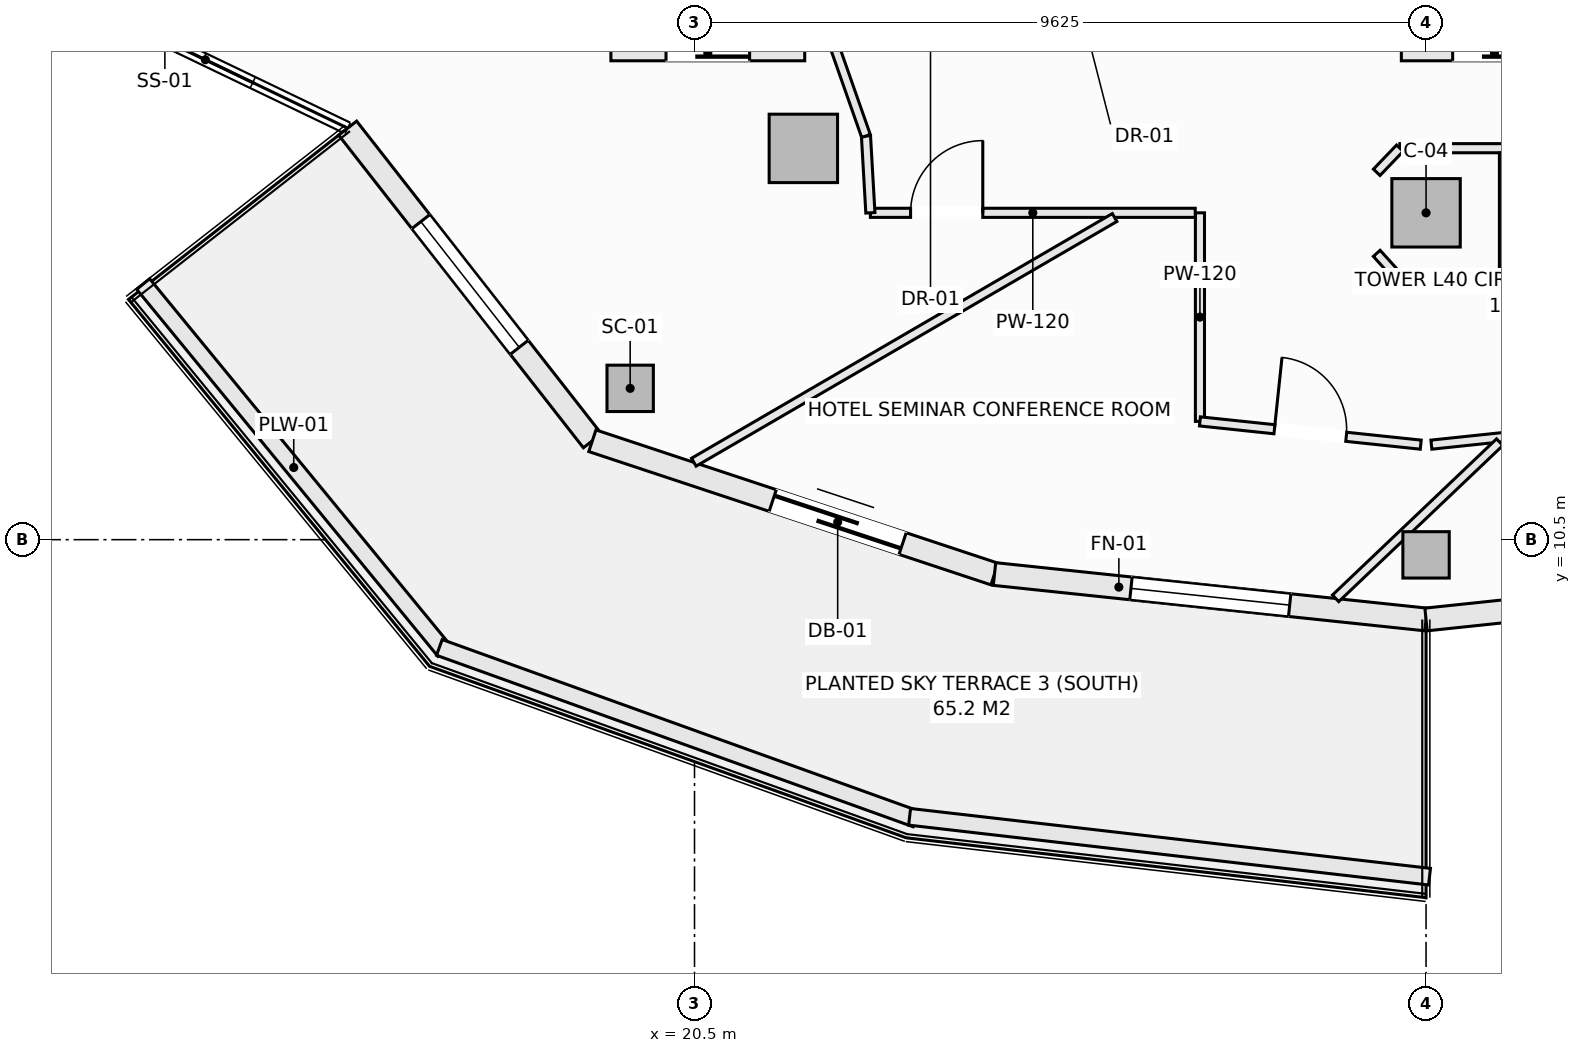
"""IFC4 building model, lengths in metres.
Left out: names, types, materials, properties, quantities, classifications, styles, units other than length and angle.
Written with IfcOpenShell. Run it as: python <this file> out.ifc"""

import sys

from ifc_helpers import new_model, si_unit, direction, frame, frame_2d, origin, origin_2d, place, context, subcontext, project, spatial, rectangle, hollow_rectangle, extrude, element, fill, save


model = new_model("IFC4")
c1 = context("Model", 3, precision=1e-05, world=origin(), true_north=direction((0.0, 1.0)))
c2 = subcontext(c1, "Body", "Model", "MODEL_VIEW")
j1 = project(units=[si_unit("LENGTHUNIT", "METRE"), si_unit("PLANEANGLEUNIT", "RADIAN")], contexts=[c1])
p1 = place(None, origin())
s1 = spatial("IfcSite", under=j1, at=p1, CompositionType="ELEMENT")
p2 = place(p1, origin())
s2 = spatial("IfcBuilding", under=s1, at=p2, CompositionType="ELEMENT")
p3 = place(p2, frame((0.0, 0.0, 156.3)))
s3 = spatial("IfcBuildingStorey", under=s2, at=p3, CompositionType="ELEMENT", Elevation=156.3)
for number, where, z_axis, x_axis in (
    (1, (19.654, 12.49, -0.27), (0.0, 0.0, 1.0), (1.0, 0.0, 0.0)),
    (2, (30.125, 10.3, -0.27), (0.0, 0.0, 1.0), (1.0, 0.0, 0.0)),
):
    element("IfcColumn", number, at=place(p3, frame(where, z_axis=z_axis, x_axis=x_axis)), inside=s3, PredefinedType="COLUMN", context=c2, shape_type="SweptSolid", body=[
        extrude(hollow_rectangle(XDim=0.61, YDim=0.61, WallThickness=0.025, at=origin_2d()), origin(), (0.0, 0.0, 1.0), 3.4),
    ])
for number, where, z_axis, x_axis in (
    (3, (21.932, 15.648, -0.27), (0.0, 0.0, 1.0), (1.0, 0.0, 0.0)),
    (4, (30.125, 14.8, -0.27), (0.0, 0.0, 1.0), (1.0, 0.0, 0.0)),
):
    element("IfcColumn", number, at=place(p3, frame(where, z_axis=z_axis, x_axis=x_axis)), inside=s3, PredefinedType="COLUMN", context=c2, shape_type="SweptSolid", body=[
        extrude(rectangle(XDim=0.9, YDim=0.9, at=origin_2d()), origin(), (0.0, 0.0, 1.0), 3.4),
    ])
p4 = place(p3, frame((15.937, 15.914, 0.0), z_axis=(0.0, 0.0, 1.0), x_axis=(0.616429245738, -0.787410302828, 0.0)))
e5 = element("IfcWall", 5, at=p4, inside=s3, PredefinedType="SOLIDWALL", context=c2, shape_type="SweptSolid", body=[
    extrude(rectangle(XDim=5.223, YDim=0.3, at=frame_2d((2.612, 0.0))), origin(), (0.0, 0.0, 1.0), 2.653),
])
p5 = place(p4, frame((1.562, 0.0, 0.74)))
e6 = element("IfcOpeningElement", 6, at=p5, cuts=e5, PredefinedType="OPENING", context=c2, shape_type="SweptSolid", body=[
    extrude(rectangle(XDim=2.1, YDim=1.7, at=frame_2d((1.05, 0.85))), frame((0.0, 0.16, 0.0), z_axis=(0.0, -1.0, 0.0), x_axis=(1.0, 0.0, 0.0)), (0.0, 0.0, 1.0), 0.32),
])
p6 = place(p3, frame((19.156, 11.801, 0.0), z_axis=(0.0, 0.0, 1.0), x_axis=(0.949246811547, -0.314532177636, 0.0)))
e7 = element("IfcWall", 7, at=p6, inside=s3, PredefinedType="SOLIDWALL", context=c2, shape_type="SweptSolid", body=[
    extrude(rectangle(XDim=5.574, YDim=0.3, at=frame_2d((2.787, 0.0))), origin(), (0.0, 0.0, 1.0), 2.653),
])
p7 = place(p6, frame((2.5, 0.0, 0.0)))
e8 = element("IfcOpeningElement", 8, at=p7, cuts=e7, PredefinedType="OPENING", context=c2, shape_type="SweptSolid", body=[
    extrude(rectangle(XDim=1.8, YDim=2.25, at=frame_2d((0.9, 1.125))), frame((0.0, 0.16, 0.0), z_axis=(0.0, -1.0, 0.0), x_axis=(1.0, 0.0, 0.0)), (0.0, 0.0, 1.0), 0.32),
])
p8 = place(p3, frame((24.447, 10.048, 0.0), z_axis=(0.0, 0.0, 1.0), x_axis=(0.994496545245, -0.104769372887, 0.0)))
e9 = element("IfcWall", 9, at=p8, inside=s3, PredefinedType="SOLIDWALL", context=c2, shape_type="SweptSolid", body=[
    extrude(rectangle(XDim=5.709, YDim=0.3, at=frame_2d((2.854, 0.0))), origin(), (0.0, 0.0, 1.0), 2.653),
])
p9 = place(p8, frame((1.805, 0.0, 0.74)))
e10 = element("IfcOpeningElement", 10, at=p9, cuts=e9, PredefinedType="OPENING", context=c2, shape_type="SweptSolid", body=[
    extrude(rectangle(XDim=2.1, YDim=1.7, at=frame_2d((1.05, 0.85))), frame((0.0, 0.16, 0.0), z_axis=(0.0, -1.0, 0.0), x_axis=(1.0, 0.0, 0.0)), (0.0, 0.0, 1.0), 0.32),
])
p10 = place(p3, frame((30.125, 9.45, 0.0), z_axis=(0.0, 0.0, 1.0), x_axis=(0.994496545245, 0.104769372887, 0.0)))
e11 = element("IfcWall", 11, at=p10, inside=s3, PredefinedType="SOLIDWALL", context=c2, shape_type="SweptSolid", body=[
    extrude(rectangle(XDim=5.709, YDim=0.3, at=frame_2d((2.854, 0.0))), origin(), (0.0, 0.0, 1.0), 2.653),
])
p11 = place(p10, frame((1.805, 0.0, 0.74)))
e12 = element("IfcOpeningElement", 12, at=p11, cuts=e11, PredefinedType="OPENING", context=c2, shape_type="SweptSolid", body=[
    extrude(rectangle(XDim=2.1, YDim=1.7, at=frame_2d((1.05, 0.85))), frame((0.0, 0.16, 0.0), z_axis=(0.0, -1.0, 0.0), x_axis=(1.0, 0.0, 0.0)), (0.0, 0.0, 1.0), 0.32),
])
p12 = place(p3, frame((13.246, 13.863, 0.0), z_axis=(0.0, 0.0, 1.0), x_axis=(0.634429234628, -0.77298094818, 0.0)))
e13 = element("IfcWall", 13, at=p12, inside=s3, PredefinedType="PARAPET", context=c2, shape_type="SweptSolid", body=[
    extrude(rectangle(XDim=6.245, YDim=0.22, at=frame_2d((3.123, 0.0))), origin(), (0.0, 0.0, 1.0), 0.52),
])
p13 = place(p3, frame((17.143, 9.082, 0.0), z_axis=(0.0, 0.0, 1.0), x_axis=(0.940948576924, -0.338549517184, 0.0)))
e14 = element("IfcWall", 14, at=p13, inside=s3, PredefinedType="PARAPET", context=c2, shape_type="SweptSolid", body=[
    extrude(rectangle(XDim=6.664, YDim=0.22, at=frame_2d((3.332, 0.0))), origin(), (0.0, 0.0, 1.0), 0.52),
])
p14 = place(p3, frame((23.33, 6.854, 0.0), z_axis=(0.0, 0.0, 1.0), x_axis=(0.993440576506, -0.114349555972, 0.0)))
e15 = element("IfcWall", 15, at=p14, inside=s3, PredefinedType="PARAPET", context=c2, shape_type="SweptSolid", body=[
    extrude(rectangle(XDim=6.885, YDim=0.22, at=frame_2d((3.443, 0.0))), origin(), (0.0, 0.0, 1.0), 0.52),
])
p15 = place(p3, frame((19.4, 16.9, 0.0), z_axis=(0.0, 0.0, 1.0), x_axis=(1.0, 0.0, 0.0)))
e16 = element("IfcWall", 16, at=p15, inside=s3, PredefinedType="SOLIDWALL", context=c2, shape_type="SweptSolid", body=[
    extrude(rectangle(XDim=2.55, YDim=0.2, at=frame_2d((1.275, 0.0))), origin(), (0.0, 0.0, 1.0), 3.13),
])
p16 = place(p15, frame((0.725, 0.0, 0.0)))
e17 = element("IfcOpeningElement", 17, at=p16, cuts=e16, PredefinedType="OPENING", context=c2, shape_type="SweptSolid", body=[
    extrude(rectangle(XDim=1.1, YDim=2.2, at=frame_2d((0.55, 1.1))), frame((0.0, 0.11, 0.0), z_axis=(0.0, -1.0, 0.0), x_axis=(1.0, 0.0, 0.0)), (0.0, 0.0, 1.0), 0.22),
])
p17 = place(p3, frame((29.8, 16.9, 0.0), z_axis=(0.0, 0.0, 1.0), x_axis=(1.0, 0.0, 0.0)))
e18 = element("IfcWall", 18, at=p17, inside=s3, PredefinedType="SOLIDWALL", context=c2, shape_type="SweptSolid", body=[
    extrude(rectangle(XDim=2.45, YDim=0.2, at=frame_2d((1.225, 0.0))), origin(), (0.0, 0.0, 1.0), 3.13),
])
p18 = place(p17, frame((0.675, 0.0, 0.0)))
e19 = element("IfcOpeningElement", 19, at=p18, cuts=e18, PredefinedType="OPENING", context=c2, shape_type="SweptSolid", body=[
    extrude(rectangle(XDim=1.1, YDim=2.2, at=frame_2d((0.55, 1.1))), frame((0.0, 0.11, 0.0), z_axis=(0.0, -1.0, 0.0), x_axis=(1.0, 0.0, 0.0)), (0.0, 0.0, 1.0), 0.22),
])
p19 = place(p3, frame((27.15, 12.056, 0.0), z_axis=(0.0, 0.0, 1.0), x_axis=(0.0, 1.0, 0.0)))
e20 = element("IfcWall", 20, at=p19, inside=s3, PredefinedType="PARTITIONING", context=c2, shape_type="SweptSolid", body=[
    extrude(rectangle(XDim=2.744, YDim=0.12, at=frame_2d((1.372, 0.0))), origin(), (0.0, 0.0, 1.0), 3.13),
])
p20 = place(p3, frame((29.78, 15.65, 0.0), z_axis=(0.0, 0.0, 1.0), x_axis=(1.0, 0.0, 0.0)))
e21 = element("IfcWall", 21, at=p20, inside=s3, PredefinedType="PARTITIONING", context=c2, shape_type="SweptSolid", body=[
    extrude(rectangle(XDim=1.37, YDim=0.12, at=frame_2d((0.685, 0.0))), origin(), (0.0, 0.0, 1.0), 3.13),
])
p21 = place(p3, frame((30.195, 11.75, 0.0), z_axis=(0.0, 0.0, 1.0), x_axis=(0.994498907508, 0.104746947287, 0.0)))
e22 = element("IfcWall", 22, at=p21, inside=s3, PredefinedType="PARTITIONING", context=c2, shape_type="SweptSolid", body=[
    extrude(rectangle(XDim=5.724, YDim=0.12, at=frame_2d((2.862, 0.0))), origin(), (0.0, 0.0, 1.0), 3.13),
])
p22 = place(p21, frame((2.594, 0.0, 0.0)))
e23 = element("IfcOpeningElement", 23, at=p22, cuts=e22, PredefinedType="OPENING", context=c2, shape_type="SweptSolid", body=[
    extrude(rectangle(XDim=0.95, YDim=2.1, at=frame_2d((0.475, 1.05))), frame((0.0, 0.07, 0.0), z_axis=(0.0, -1.0, 0.0), x_axis=(1.0, 0.0, 0.0)), (0.0, 0.0, 1.0), 0.14),
])
p23 = place(p3, frame((27.15, 12.056, 0.0), z_axis=(0.0, 0.0, 1.0), x_axis=(0.994501330468, -0.104723940422, 0.0)))
e24 = element("IfcWall", 24, at=p23, inside=s3, PredefinedType="PARTITIONING", context=c2, shape_type="SweptSolid", body=[
    extrude(rectangle(XDim=2.921, YDim=0.12, at=frame_2d((1.46, 0.0))), origin(), (0.0, 0.0, 1.0), 3.13),
])
p24 = place(p23, frame((0.986, 0.0, 0.0)))
e25 = element("IfcOpeningElement", 25, at=p24, cuts=e24, PredefinedType="OPENING", context=c2, shape_type="SweptSolid", body=[
    extrude(rectangle(XDim=0.95, YDim=2.1, at=frame_2d((0.475, 1.05))), frame((0.0, 0.07, 0.0), z_axis=(0.0, -1.0, 0.0), x_axis=(1.0, 0.0, 0.0)), (0.0, 0.0, 1.0), 0.14),
])
p25 = place(p3, frame((22.814, 14.8, 0.0), z_axis=(0.0, 0.0, 1.0), x_axis=(1.0, 0.0, 0.0)))
e26 = element("IfcWall", 26, at=p25, inside=s3, PredefinedType="PARTITIONING", context=c2, shape_type="SweptSolid", body=[
    extrude(rectangle(XDim=4.274, YDim=0.12, at=frame_2d((2.137, 0.0))), origin(), (0.0, 0.0, 1.0), 3.13),
])
p26 = place(p25, frame((0.529, 0.0, 0.0)))
e27 = element("IfcOpeningElement", 27, at=p26, cuts=e26, PredefinedType="OPENING", context=c2, shape_type="SweptSolid", body=[
    extrude(rectangle(XDim=0.95, YDim=2.1, at=frame_2d((0.475, 1.05))), frame((0.0, 0.07, 0.0), z_axis=(0.0, -1.0, 0.0), x_axis=(1.0, 0.0, 0.0)), (0.0, 0.0, 1.0), 0.14),
])
p27 = place(p3, frame((22.756, 15.811, 0.0), z_axis=(0.0, 0.0, 1.0), x_axis=(0.057139047697, -0.998366230012, 0.0)))
e28 = element("IfcWall", 28, at=p27, inside=s3, PredefinedType="PARTITIONING", context=c2, shape_type="SweptSolid", body=[
    extrude(rectangle(XDim=1.013, YDim=0.12, at=frame_2d((0.506, 0.0))), origin(), (0.0, 0.0, 1.0), 3.13),
])
p28 = place(p3, frame((22.353, 16.958, 0.0), z_axis=(0.0, 0.0, 1.0), x_axis=(0.331370038458, -0.943500873138, 0.0)))
e29 = element("IfcWall", 29, at=p28, inside=s3, PredefinedType="PARTITIONING", context=c2, shape_type="SweptSolid", body=[
    extrude(rectangle(XDim=1.216, YDim=0.12, at=frame_2d((0.608, 0.0))), origin(), (0.0, 0.0, 1.0), 3.13),
])
p29 = place(p3, frame((29.476, 15.333, 0.0), z_axis=(0.0, 0.0, 1.0), x_axis=(0.692219273951, 0.721687243043, 0.0)))
e30 = element("IfcWall", 30, at=p29, inside=s3, PredefinedType="PARTITIONING", context=c2, shape_type="SweptSolid", body=[
    extrude(rectangle(XDim=0.439, YDim=0.12, at=frame_2d((0.22, 0.0))), origin(), (0.0, 0.0, 1.0), 3.13),
])
p30 = place(p3, frame((29.476, 14.267, 0.0), z_axis=(0.0, 0.0, 1.0), x_axis=(0.670659392016, -0.741765448037, 0.0)))
e31 = element("IfcWall", 31, at=p30, inside=s3, PredefinedType="PARTITIONING", context=c2, shape_type="SweptSolid", body=[
    extrude(rectangle(XDim=0.453, YDim=0.12, at=frame_2d((0.227, 0.0))), origin(), (0.0, 0.0, 1.0), 3.13),
])
p31 = place(p3, frame((29.78, 13.85, 0.0), z_axis=(0.0, 0.0, 1.0), x_axis=(1.0, 0.0, 0.0)))
e32 = element("IfcWall", 32, at=p31, inside=s3, PredefinedType="PARTITIONING", context=c2, shape_type="SweptSolid", body=[
    extrude(rectangle(XDim=1.37, YDim=0.12, at=frame_2d((0.685, 0.0))), origin(), (0.0, 0.0, 1.0), 3.13),
])
p32 = place(p3, frame((31.15, 13.912, 0.0), z_axis=(0.0, 0.0, 1.0), x_axis=(0.0, 1.0, 0.0)))
e33 = element("IfcWall", 33, at=p32, inside=s3, PredefinedType="PARTITIONING", context=c2, shape_type="SweptSolid", body=[
    extrude(rectangle(XDim=1.676, YDim=0.12, at=frame_2d((0.838, 0.0))), origin(), (0.0, 0.0, 1.0), 3.13),
])
p33 = place(p3, frame((20.491, 11.519, 0.0), z_axis=(0.0, 0.0, 1.0), x_axis=(0.864495629624, 0.502640334991, 0.0)))
e34 = element("IfcWall", 34, at=p33, inside=s3, PredefinedType="PARTITIONING", context=c2, shape_type="SweptSolid", body=[
    extrude(rectangle(XDim=6.404, YDim=0.12, at=frame_2d((3.202, 0.0))), origin(), (0.0, 0.0, 1.0), 3.13),
])
p34 = place(p3, frame((28.935, 9.728, 0.0), z_axis=(0.0, 0.0, 1.0), x_axis=(0.724541098321, 0.689231598843, 0.0)))
e35 = element("IfcWall", 35, at=p34, inside=s3, PredefinedType="PARTITIONING", context=c2, shape_type="SweptSolid", body=[
    extrude(rectangle(XDim=2.98, YDim=0.12, at=frame_2d((1.49, 0.0))), origin(), (0.0, 0.0, 1.0), 3.13),
])
p35 = place(p5, origin())
e36 = element("IfcWindow", 36, at=p35, inside=s3, PartitioningType="SINGLE_PANEL", PredefinedType="WINDOW", context=c2, shape_type="SweptSolid", body=[
    extrude(rectangle(XDim=2.1, YDim=1.7, at=frame_2d((1.05, 0.85))), frame((0.0, 0.03, 0.0), z_axis=(0.0, -1.0, 0.0), x_axis=(1.0, 0.0, 0.0)), (0.0, 0.0, 1.0), 0.06),
])
fill(e6, e36)
p36 = place(p7, frame((1.8, 0.0, 0.0), z_axis=(0.0, 0.0, 1.0), x_axis=(-1.0, 0.0, 0.0)))
e37 = element("IfcDoor", 37, at=p36, inside=s3, OperationType="SLIDING_TO_LEFT", PredefinedType="DOOR", context=c2, shape_type="SweptSolid", body=[
    extrude(rectangle(XDim=1.8, YDim=2.25, at=frame_2d((0.9, 1.125))), frame((0.0, 0.025, 0.0), z_axis=(0.0, -1.0, 0.0), x_axis=(1.0, 0.0, 0.0)), (0.0, 0.0, 1.0), 0.05),
])
fill(e8, e37)
p37 = place(p9, origin())
e38 = element("IfcWindow", 38, at=p37, inside=s3, PartitioningType="SINGLE_PANEL", PredefinedType="WINDOW", context=c2, shape_type="SweptSolid", body=[
    extrude(rectangle(XDim=2.1, YDim=1.7, at=frame_2d((1.05, 0.85))), frame((0.0, 0.03, 0.0), z_axis=(0.0, -1.0, 0.0), x_axis=(1.0, 0.0, 0.0)), (0.0, 0.0, 1.0), 0.06),
])
fill(e10, e38)
p38 = place(p16, origin())
e39 = element("IfcDoor", 39, at=p38, inside=s3, OperationType="SLIDING_TO_LEFT", PredefinedType="DOOR", context=c2, shape_type="SweptSolid", body=[
    extrude(rectangle(XDim=1.1, YDim=2.2, at=frame_2d((0.55, 1.1))), frame((0.0, 0.025, 0.0), z_axis=(0.0, -1.0, 0.0), x_axis=(1.0, 0.0, 0.0)), (0.0, 0.0, 1.0), 0.05),
])
fill(e17, e39)
p39 = place(p18, origin())
e40 = element("IfcDoor", 40, at=p39, inside=s3, OperationType="SLIDING_TO_LEFT", PredefinedType="DOOR", context=c2, shape_type="SweptSolid", body=[
    extrude(rectangle(XDim=1.1, YDim=2.2, at=frame_2d((0.55, 1.1))), frame((0.0, 0.025, 0.0), z_axis=(0.0, -1.0, 0.0), x_axis=(1.0, 0.0, 0.0)), (0.0, 0.0, 1.0), 0.05),
])
fill(e19, e40)
p40 = place(p26, origin())
e41 = element("IfcDoor", 41, at=p40, inside=s3, OperationType="SINGLE_SWING_RIGHT", PredefinedType="DOOR", context=c2, shape_type="SweptSolid", body=[
    extrude(rectangle(XDim=0.95, YDim=2.1, at=frame_2d((0.475, 1.05))), frame((0.0, 0.025, 0.0), z_axis=(0.0, -1.0, 0.0), x_axis=(1.0, 0.0, 0.0)), (0.0, 0.0, 1.0), 0.05),
])
fill(e27, e41)
p41 = place(p24, origin())
e42 = element("IfcDoor", 42, at=p41, inside=s3, OperationType="SINGLE_SWING_LEFT", PredefinedType="DOOR", context=c2, shape_type="SweptSolid", body=[
    extrude(rectangle(XDim=0.95, YDim=2.1, at=frame_2d((0.475, 1.05))), frame((0.0, 0.025, 0.0), z_axis=(0.0, -1.0, 0.0), x_axis=(1.0, 0.0, 0.0)), (0.0, 0.0, 1.0), 0.05),
])
fill(e25, e42)
save(model, sys.argv[1])
